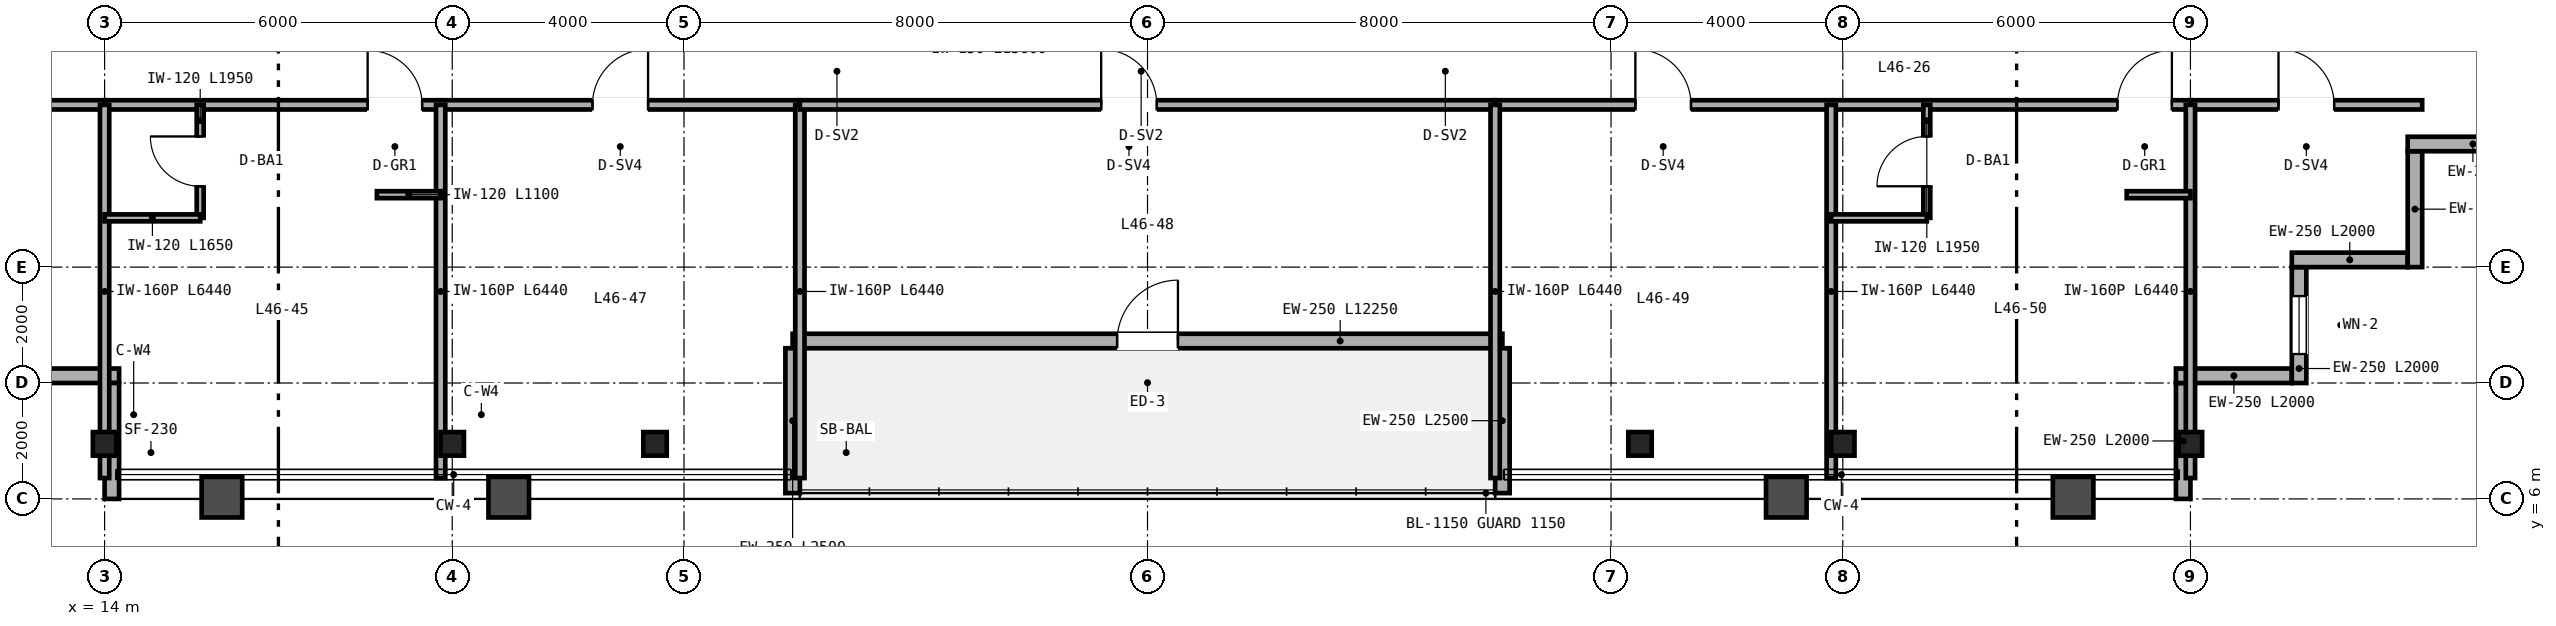
"""IFC4 building model, lengths in metres.
Left out: names, types, materials, properties, quantities, classifications, styles, units other than length and angle.
Written with IfcOpenShell. Run it as: python <this file> out.ifc"""

import sys

from ifc_helpers import new_model, si_unit, direction, frame, frame_2d, origin, origin_2d, place, context, subcontext, project, spatial, rectangle, i_section, extrude, source, transform, mapped, element, fill, save


model = new_model("IFC4")
c1 = context("Model", 3, precision=1e-05, world=origin(), true_north=direction((0.0, 1.0)))
c2 = subcontext(c1, "Body", "Model", "MODEL_VIEW")
j1 = project(units=[si_unit("LENGTHUNIT", "METRE"), si_unit("PLANEANGLEUNIT", "RADIAN")], contexts=[c1])
p1 = place(None, origin())
s1 = spatial("IfcSite", under=j1, at=p1, CompositionType="ELEMENT")
p2 = place(p1, origin())
s2 = spatial("IfcBuilding", under=s1, at=p2, CompositionType="ELEMENT")
p3 = place(p2, frame((0.0, 0.0, 184.8)))
s3 = spatial("IfcBuildingStorey", under=s2, at=p3, CompositionType="ELEMENT", Elevation=184.8)
m1 = source(origin(), c2, "Body", "SweptSolid", [
    extrude(i_section(OverallWidth=0.404, OverallDepth=0.407, WebThickness=0.027, FlangeThickness=0.044, FilletRadius=0.025, at=origin_2d()), origin(), (0.0, 0.0, 1.0), 3.37),
])
for number, where, z_axis, x_axis in (
    (1, (14.0, 6.95, 0.0), (0.0, 0.0, 1.0), (1.0, 0.0, 0.0)),
    (2, (20.0, 6.95, 0.0), (0.0, 0.0, 1.0), (1.0, 0.0, 0.0)),
    (3, (23.5, 6.95, 0.0), (0.0, 0.0, 1.0), (1.0, 0.0, 0.0)),
    (4, (40.5, 6.95, 0.0), (0.0, 0.0, 1.0), (1.0, 0.0, 0.0)),
    (5, (44.0, 6.95, 0.0), (0.0, 0.0, 1.0), (1.0, 0.0, 0.0)),
    (6, (50.0, 6.95, 0.0), (0.0, 0.0, 1.0), (1.0, 0.0, 0.0)),
):
    element("IfcColumn", number, at=place(p3, frame(where, z_axis=z_axis, x_axis=x_axis)), inside=s3, PredefinedType="COLUMN", context=c2, shape_type="MappedRepresentation", body=[
        mapped(m1, transform((0.0, 0.0, 0.0), scale=1.0)),
    ])
p4 = place(p3, frame((49.875, 6.0, 0.0), z_axis=(0.0, 0.0, 1.0), x_axis=(0.0, 1.0, 0.0)))
e7 = element("IfcWall", 7, at=p4, inside=s3, PredefinedType="SOLIDWALL", context=c2, shape_type="SweptSolid", body=[
    extrude(rectangle(XDim=2.0, YDim=0.25, at=frame_2d((1.0, 0.0))), origin(), (0.0, 0.0, 1.0), 2.677),
])
p5 = place(p3, frame((49.75, 8.125, 0.0), z_axis=(0.0, 0.0, 1.0), x_axis=(1.0, 0.0, 0.0)))
e8 = element("IfcWall", 8, at=p5, inside=s3, PredefinedType="SOLIDWALL", context=c2, shape_type="SweptSolid", body=[
    extrude(rectangle(XDim=2.0, YDim=0.25, at=frame_2d((1.0, 0.0))), origin(), (0.0, 0.0, 1.0), 3.37),
])
p6 = place(p3, frame((51.875, 8.0, 0.0), z_axis=(0.0, 0.0, 1.0), x_axis=(0.0, 1.0, 0.0)))
e9 = element("IfcWall", 9, at=p6, inside=s3, PredefinedType="SOLIDWALL", context=c2, shape_type="SweptSolid", body=[
    extrude(rectangle(XDim=2.0, YDim=0.25, at=frame_2d((1.0, 0.0))), origin(), (0.0, 0.0, 1.0), 3.37),
])
p7 = place(p6, frame((0.5, 0.0, 0.85)))
e10 = element("IfcOpeningElement", 10, at=p7, cuts=e9, PredefinedType="OPENING", context=c2, shape_type="SweptSolid", body=[
    extrude(rectangle(XDim=1.0, YDim=1.9, at=frame_2d((0.5, 0.95))), frame((0.0, 0.135, 0.0), z_axis=(0.0, -1.0, 0.0), x_axis=(1.0, 0.0, 0.0)), (0.0, 0.0, 1.0), 0.27),
])
for number, where, z_axis, x_axis in (
    (11, (51.75, 10.125, 0.0), (0.0, 0.0, 1.0), (1.0, 0.0, 0.0)),
    (12, (53.875, 10.0, 0.0), (0.0, 0.0, 1.0), (0.0, 1.0, 0.0)),
):
    element("IfcWall", number, at=place(p3, frame(where, z_axis=z_axis, x_axis=x_axis)), inside=s3, PredefinedType="SOLIDWALL", context=c2, shape_type="SweptSolid", body=[
        extrude(rectangle(XDim=2.0, YDim=0.25, at=frame_2d((1.0, 0.0))), origin(), (0.0, 0.0, 1.0), 3.37),
    ])
p8 = place(p3, frame((53.75, 12.125, 0.0), z_axis=(0.0, 0.0, 1.0), x_axis=(1.0, 0.0, 0.0)))
e13 = element("IfcWall", 13, at=p8, inside=s3, PredefinedType="SOLIDWALL", context=c2, shape_type="SweptSolid", body=[
    extrude(rectangle(XDim=2.25, YDim=0.25, at=frame_2d((1.125, 0.0))), origin(), (0.0, 0.0, 1.0), 3.37),
])
p9 = place(p3, frame((12.25, 8.125, 0.0), z_axis=(0.0, 0.0, 1.0), x_axis=(1.0, 0.0, 0.0)))
e14 = element("IfcWall", 14, at=p9, inside=s3, PredefinedType="SOLIDWALL", context=c2, shape_type="SweptSolid", body=[
    extrude(rectangle(XDim=2.0, YDim=0.25, at=frame_2d((1.0, 0.0))), origin(), (0.0, 0.0, 1.0), 3.37),
])
p10 = place(p3, frame((14.125, 8.0, 0.0), z_axis=(0.0, 0.0, 1.0), x_axis=(0.0, -1.0, 0.0)))
e15 = element("IfcWall", 15, at=p10, inside=s3, PredefinedType="SOLIDWALL", context=c2, shape_type="SweptSolid", body=[
    extrude(rectangle(XDim=2.0, YDim=0.25, at=frame_2d((1.0, 0.0))), origin(), (0.0, 0.0, 1.0), 2.677),
])
p11 = place(p3, frame((25.875, 8.725, 0.0), z_axis=(0.0, 0.0, 1.0), x_axis=(1.0, 0.0, 0.0)))
e16 = element("IfcWall", 16, at=p11, inside=s3, PredefinedType="SOLIDWALL", context=c2, shape_type="SweptSolid", body=[
    extrude(rectangle(XDim=12.25, YDim=0.25, at=frame_2d((6.125, 0.0))), origin(), (0.0, 0.0, 1.0), 3.37),
])
p12 = place(p11, frame((5.6, 0.0, 0.0)))
e17 = element("IfcOpeningElement", 17, at=p12, cuts=e16, PredefinedType="OPENING", context=c2, shape_type="SweptSolid", body=[
    extrude(rectangle(XDim=1.05, YDim=2.15, at=frame_2d((0.525, 1.075))), frame((0.0, 0.135, 0.0), z_axis=(0.0, -1.0, 0.0), x_axis=(1.0, 0.0, 0.0)), (0.0, 0.0, 1.0), 0.27),
])
for number, where, z_axis, x_axis in (
    (18, (25.875, 6.1, 0.0), (0.0, 0.0, 1.0), (0.0, 1.0, 0.0)),
    (19, (38.125, 6.1, 0.0), (0.0, 0.0, 1.0), (0.0, 1.0, 0.0)),
):
    element("IfcWall", number, at=place(p3, frame(where, z_axis=z_axis, x_axis=x_axis)), inside=s3, PredefinedType="SOLIDWALL", context=c2, shape_type="SweptSolid", body=[
        extrude(rectangle(XDim=2.5, YDim=0.25, at=frame_2d((1.25, 0.0))), origin(), (0.0, 0.0, 1.0), 2.443),
    ])
p13 = place(p3, frame((10.0, 12.8, 0.0), z_axis=(0.0, 0.0, 1.0), x_axis=(1.0, 0.0, 0.0)))
e20 = element("IfcWall", 20, at=p13, inside=s3, PredefinedType="PARTITIONING", context=c2, shape_type="SweptSolid", body=[
    extrude(rectangle(XDim=4.0, YDim=0.16, at=frame_2d((2.0, 0.0))), origin(), (0.0, 0.0, 1.0), 3.37),
])
p14 = place(p13, frame((1.52, 0.0, 0.0)))
e21 = element("IfcOpeningElement", 21, at=p14, cuts=e20, PredefinedType="OPENING", context=c2, shape_type="SweptSolid", body=[
    extrude(rectangle(XDim=0.96, YDim=2.15, at=frame_2d((0.48, 1.075))), frame((0.0, 0.09, 0.0), z_axis=(0.0, -1.0, 0.0), x_axis=(1.0, 0.0, 0.0)), (0.0, 0.0, 1.0), 0.18),
])
p15 = place(p3, frame((50.0, 12.8, 0.0), z_axis=(0.0, 0.0, 1.0), x_axis=(1.0, 0.0, 0.0)))
e22 = element("IfcWall", 22, at=p15, inside=s3, PredefinedType="PARTITIONING", context=c2, shape_type="SweptSolid", body=[
    extrude(rectangle(XDim=4.0, YDim=0.16, at=frame_2d((2.0, 0.0))), origin(), (0.0, 0.0, 1.0), 3.37),
])
p16 = place(p15, frame((1.52, 0.0, 0.0)))
e23 = element("IfcOpeningElement", 23, at=p16, cuts=e22, PredefinedType="OPENING", context=c2, shape_type="SweptSolid", body=[
    extrude(rectangle(XDim=0.96, YDim=2.15, at=frame_2d((0.48, 1.075))), frame((0.0, 0.09, 0.0), z_axis=(0.0, -1.0, 0.0), x_axis=(1.0, 0.0, 0.0)), (0.0, 0.0, 1.0), 0.18),
])
p17 = place(p3, frame((14.0, 12.8, 0.0), z_axis=(0.0, 0.0, 1.0), x_axis=(1.0, 0.0, 0.0)))
e24 = element("IfcWall", 24, at=p17, inside=s3, PredefinedType="PARTITIONING", context=c2, shape_type="SweptSolid", body=[
    extrude(rectangle(XDim=12.0, YDim=0.16, at=frame_2d((6.0, 0.0))), origin(), (0.0, 0.0, 1.0), 2.913),
])
p18 = place(p17, frame((4.54, 0.0, 0.0)))
e25 = element("IfcOpeningElement", 25, at=p18, cuts=e24, PredefinedType="OPENING", context=c2, shape_type="SweptSolid", body=[
    extrude(rectangle(XDim=0.94, YDim=2.15, at=frame_2d((0.47, 1.075))), frame((0.0, 0.09, 0.0), z_axis=(0.0, -1.0, 0.0), x_axis=(1.0, 0.0, 0.0)), (0.0, 0.0, 1.0), 0.18),
])
p19 = place(p17, frame((8.42, 0.0, 0.0)))
e26 = element("IfcOpeningElement", 26, at=p19, cuts=e24, PredefinedType="OPENING", context=c2, shape_type="SweptSolid", body=[
    extrude(rectangle(XDim=0.96, YDim=2.15, at=frame_2d((0.48, 1.075))), frame((0.0, 0.09, 0.0), z_axis=(0.0, -1.0, 0.0), x_axis=(1.0, 0.0, 0.0)), (0.0, 0.0, 1.0), 0.18),
])
p20 = place(p3, frame((14.0, 6.36, 0.0), z_axis=(0.0, 0.0, 1.0), x_axis=(0.0, 1.0, 0.0)))
e27 = element("IfcWall", 27, at=p20, inside=s3, PredefinedType="PARTITIONING", context=c2, shape_type="SweptSolid", body=[
    extrude(rectangle(XDim=6.44, YDim=0.16, at=frame_2d((3.22, 0.0))), origin(), (0.0, 0.0, 1.0), 2.677),
])
p21 = place(p3, frame((26.0, 6.36, 0.0), z_axis=(0.0, 0.0, 1.0), x_axis=(0.0, 1.0, 0.0)))
e28 = element("IfcWall", 28, at=p21, inside=s3, PredefinedType="PARTITIONING", context=c2, shape_type="SweptSolid", body=[
    extrude(rectangle(XDim=6.44, YDim=0.16, at=frame_2d((3.22, 0.0))), origin(), (0.0, 0.0, 1.0), 2.443),
])
p22 = place(p3, frame((19.8, 6.36, 0.0), z_axis=(0.0, 0.0, 1.0), x_axis=(0.0, 1.0, 0.0)))
e29 = element("IfcWall", 29, at=p22, inside=s3, PredefinedType="PARTITIONING", context=c2, shape_type="SweptSolid", body=[
    extrude(rectangle(XDim=6.44, YDim=0.16, at=frame_2d((3.22, 0.0))), origin(), (0.0, 0.0, 1.0), 2.677),
])
p23 = place(p3, frame((15.65, 10.85, 0.0), z_axis=(0.0, 0.0, 1.0), x_axis=(0.0, 1.0, 0.0)))
e30 = element("IfcWall", 30, at=p23, inside=s3, PredefinedType="PARTITIONING", context=c2, shape_type="SweptSolid", body=[
    extrude(rectangle(XDim=1.95, YDim=0.12, at=frame_2d((0.975, 0.0))), origin(), (0.0, 0.0, 1.0), 3.37),
])
p24 = place(p23, frame((0.545, 0.0, 0.0)))
e31 = element("IfcOpeningElement", 31, at=p24, cuts=e30, PredefinedType="OPENING", context=c2, shape_type="SweptSolid", body=[
    extrude(rectangle(XDim=0.86, YDim=2.1, at=frame_2d((0.43, 1.05))), frame((0.0, 0.07, 0.0), z_axis=(0.0, -1.0, 0.0), x_axis=(1.0, 0.0, 0.0)), (0.0, 0.0, 1.0), 0.14),
])
p25 = place(p3, frame((14.0, 10.85, 0.0), z_axis=(0.0, 0.0, 1.0), x_axis=(1.0, 0.0, 0.0)))
e32 = element("IfcWall", 32, at=p25, inside=s3, PredefinedType="PARTITIONING", context=c2, shape_type="SweptSolid", body=[
    extrude(rectangle(XDim=1.65, YDim=0.12, at=frame_2d((0.825, 0.0))), origin(), (0.0, 0.0, 1.0), 3.37),
])
p26 = place(p3, frame((18.7, 11.25, 0.0), z_axis=(0.0, 0.0, 1.0), x_axis=(1.0, 0.0, 0.0)))
e33 = element("IfcWall", 33, at=p26, inside=s3, PredefinedType="PARTITIONING", context=c2, shape_type="SweptSolid", body=[
    extrude(rectangle(XDim=1.1, YDim=0.12, at=frame_2d((0.55, 0.0))), origin(), (0.0, 0.0, 1.0), 3.37),
])
p27 = place(p3, frame((26.0, 12.8, 0.0), z_axis=(0.0, 0.0, 1.0), x_axis=(1.0, 0.0, 0.0)))
e34 = element("IfcWall", 34, at=p27, inside=s3, PredefinedType="PARTITIONING", context=c2, shape_type="SweptSolid", body=[
    extrude(rectangle(XDim=12.0, YDim=0.16, at=frame_2d((6.0, 0.0))), origin(), (0.0, 0.0, 1.0), 3.37),
])
p28 = place(p27, frame((5.2, 0.0, 0.0)))
e35 = element("IfcOpeningElement", 35, at=p28, cuts=e34, PredefinedType="OPENING", context=c2, shape_type="SweptSolid", body=[
    extrude(rectangle(XDim=0.96, YDim=2.15, at=frame_2d((0.48, 1.075))), frame((0.0, 0.09, 0.0), z_axis=(0.0, -1.0, 0.0), x_axis=(1.0, 0.0, 0.0)), (0.0, 0.0, 1.0), 0.18),
])
p29 = place(p3, frame((38.0, 12.8, 0.0), z_axis=(0.0, 0.0, 1.0), x_axis=(1.0, 0.0, 0.0)))
e36 = element("IfcWall", 36, at=p29, inside=s3, PredefinedType="PARTITIONING", context=c2, shape_type="SweptSolid", body=[
    extrude(rectangle(XDim=12.0, YDim=0.16, at=frame_2d((6.0, 0.0))), origin(), (0.0, 0.0, 1.0), 2.913),
])
p30 = place(p29, frame((2.42, 0.0, 0.0)))
e37 = element("IfcOpeningElement", 37, at=p30, cuts=e36, PredefinedType="OPENING", context=c2, shape_type="SweptSolid", body=[
    extrude(rectangle(XDim=0.96, YDim=2.15, at=frame_2d((0.48, 1.075))), frame((0.0, 0.09, 0.0), z_axis=(0.0, -1.0, 0.0), x_axis=(1.0, 0.0, 0.0)), (0.0, 0.0, 1.0), 0.18),
])
p31 = place(p29, frame((10.74, 0.0, 0.0)))
e38 = element("IfcOpeningElement", 38, at=p31, cuts=e36, PredefinedType="OPENING", context=c2, shape_type="SweptSolid", body=[
    extrude(rectangle(XDim=0.94, YDim=2.15, at=frame_2d((0.47, 1.075))), frame((0.0, 0.09, 0.0), z_axis=(0.0, -1.0, 0.0), x_axis=(1.0, 0.0, 0.0)), (0.0, 0.0, 1.0), 0.18),
])
p32 = place(p3, frame((38.0, 6.36, 0.0), z_axis=(0.0, 0.0, 1.0), x_axis=(0.0, 1.0, 0.0)))
e39 = element("IfcWall", 39, at=p32, inside=s3, PredefinedType="PARTITIONING", context=c2, shape_type="SweptSolid", body=[
    extrude(rectangle(XDim=6.44, YDim=0.16, at=frame_2d((3.22, 0.0))), origin(), (0.0, 0.0, 1.0), 2.443),
])
for number, where, z_axis, x_axis in (
    (40, (50.0, 6.36, 0.0), (0.0, 0.0, 1.0), (0.0, 1.0, 0.0)),
    (41, (43.8, 6.36, 0.0), (0.0, 0.0, 1.0), (0.0, 1.0, 0.0)),
):
    element("IfcWall", number, at=place(p3, frame(where, z_axis=z_axis, x_axis=x_axis)), inside=s3, PredefinedType="PARTITIONING", context=c2, shape_type="SweptSolid", body=[
        extrude(rectangle(XDim=6.44, YDim=0.16, at=frame_2d((3.22, 0.0))), origin(), (0.0, 0.0, 1.0), 2.677),
    ])
p33 = place(p3, frame((45.45, 10.85, 0.0), z_axis=(0.0, 0.0, 1.0), x_axis=(0.0, 1.0, 0.0)))
e42 = element("IfcWall", 42, at=p33, inside=s3, PredefinedType="PARTITIONING", context=c2, shape_type="SweptSolid", body=[
    extrude(rectangle(XDim=1.95, YDim=0.12, at=frame_2d((0.975, 0.0))), origin(), (0.0, 0.0, 1.0), 3.37),
])
p34 = place(p33, frame((0.545, 0.0, 0.0)))
e43 = element("IfcOpeningElement", 43, at=p34, cuts=e42, PredefinedType="OPENING", context=c2, shape_type="SweptSolid", body=[
    extrude(rectangle(XDim=0.86, YDim=2.1, at=frame_2d((0.43, 1.05))), frame((0.0, 0.07, 0.0), z_axis=(0.0, -1.0, 0.0), x_axis=(1.0, 0.0, 0.0)), (0.0, 0.0, 1.0), 0.14),
])
p35 = place(p3, frame((43.8, 10.85, 0.0), z_axis=(0.0, 0.0, 1.0), x_axis=(1.0, 0.0, 0.0)))
e44 = element("IfcWall", 44, at=p35, inside=s3, PredefinedType="PARTITIONING", context=c2, shape_type="SweptSolid", body=[
    extrude(rectangle(XDim=1.65, YDim=0.12, at=frame_2d((0.825, 0.0))), origin(), (0.0, 0.0, 1.0), 3.37),
])
p36 = place(p3, frame((48.9, 11.25, 0.0), z_axis=(0.0, 0.0, 1.0), x_axis=(1.0, 0.0, 0.0)))
e45 = element("IfcWall", 45, at=p36, inside=s3, PredefinedType="PARTITIONING", context=c2, shape_type="SweptSolid", body=[
    extrude(rectangle(XDim=1.1, YDim=0.12, at=frame_2d((0.55, 0.0))), origin(), (0.0, 0.0, 1.0), 3.37),
])
m2 = source(origin(), c2, "Body", "SweptSolid", [
    extrude(rectangle(XDim=1.0, YDim=1.9, at=frame_2d((0.5, 0.95))), frame((0.0, 0.03, 0.0), z_axis=(0.0, -1.0, 0.0), x_axis=(1.0, 0.0, 0.0)), (0.0, 0.0, 1.0), 0.06),
])
p37 = place(p7, origin())
e46 = element("IfcWindow", 46, at=p37, inside=s3, PartitioningType="SINGLE_PANEL", PredefinedType="WINDOW", context=c2, shape_type="MappedRepresentation", body=[
    mapped(m2, transform((0.0, 0.0, 0.0), scale=1.0)),
])
fill(e10, e46)
m3 = source(origin(), c2, "Body", "SweptSolid", [
    extrude(rectangle(XDim=1.05, YDim=2.15, at=frame_2d((0.525, 1.075))), frame((0.0, 0.025, 0.0), z_axis=(0.0, -1.0, 0.0), x_axis=(1.0, 0.0, 0.0)), (0.0, 0.0, 1.0), 0.05),
])
p38 = place(p12, origin())
e47 = element("IfcDoor", 47, at=p38, inside=s3, OperationType="SINGLE_SWING_RIGHT", PredefinedType="DOOR", context=c2, shape_type="MappedRepresentation", body=[
    mapped(m3, transform((0.0, 0.0, 0.0), scale=1.0)),
])
fill(e17, e47)
m4 = source(origin(), c2, "Body", "SweptSolid", [
    extrude(rectangle(XDim=0.96, YDim=2.15, at=frame_2d((0.48, 1.075))), frame((0.0, 0.025, 0.0), z_axis=(0.0, -1.0, 0.0), x_axis=(1.0, 0.0, 0.0)), (0.0, 0.0, 1.0), 0.05),
])
p39 = place(p16, origin())
e48 = element("IfcDoor", 48, at=p39, inside=s3, OperationType="SINGLE_SWING_LEFT", PredefinedType="DOOR", context=c2, shape_type="MappedRepresentation", body=[
    mapped(m4, transform((0.0, 0.0, 0.0), scale=1.0)),
])
fill(e23, e48)
m5 = source(origin(), c2, "Body", "SweptSolid", [
    extrude(rectangle(XDim=0.86, YDim=2.1, at=frame_2d((0.43, 1.05))), frame((0.0, 0.025, 0.0), z_axis=(0.0, -1.0, 0.0), x_axis=(1.0, 0.0, 0.0)), (0.0, 0.0, 1.0), 0.05),
])
p40 = place(p24, origin())
e49 = element("IfcDoor", 49, at=p40, inside=s3, OperationType="SINGLE_SWING_RIGHT", PredefinedType="DOOR", context=c2, shape_type="MappedRepresentation", body=[
    mapped(m5, transform((0.0, 0.0, 0.0), scale=1.0)),
])
fill(e31, e49)
m6 = source(origin(), c2, "Body", "SweptSolid", [
    extrude(rectangle(XDim=0.94, YDim=2.15, at=frame_2d((0.47, 1.075))), frame((0.0, 0.025, 0.0), z_axis=(0.0, -1.0, 0.0), x_axis=(1.0, 0.0, 0.0)), (0.0, 0.0, 1.0), 0.05),
])
p41 = place(p18, origin())
e50 = element("IfcDoor", 50, at=p41, inside=s3, OperationType="SINGLE_SWING_LEFT", PredefinedType="DOOR", context=c2, shape_type="MappedRepresentation", body=[
    mapped(m6, transform((0.0, 0.0, 0.0), scale=1.0)),
])
fill(e25, e50)
p42 = place(p19, origin())
e51 = element("IfcDoor", 51, at=p42, inside=s3, OperationType="SINGLE_SWING_RIGHT", PredefinedType="DOOR", context=c2, shape_type="MappedRepresentation", body=[
    mapped(m4, transform((0.0, 0.0, 0.0), scale=1.0)),
])
fill(e26, e51)
p43 = place(p28, origin())
e52 = element("IfcDoor", 52, at=p43, inside=s3, OperationType="SINGLE_SWING_LEFT", PredefinedType="DOOR", context=c2, shape_type="MappedRepresentation", body=[
    mapped(m4, transform((0.0, 0.0, 0.0), scale=1.0)),
])
fill(e35, e52)
p44 = place(p34, origin())
e53 = element("IfcDoor", 53, at=p44, inside=s3, OperationType="SINGLE_SWING_LEFT", PredefinedType="DOOR", context=c2, shape_type="MappedRepresentation", body=[
    mapped(m5, transform((0.0, 0.0, 0.0), scale=1.0)),
])
fill(e43, e53)
p45 = place(p30, origin())
e54 = element("IfcDoor", 54, at=p45, inside=s3, OperationType="SINGLE_SWING_LEFT", PredefinedType="DOOR", context=c2, shape_type="MappedRepresentation", body=[
    mapped(m4, transform((0.0, 0.0, 0.0), scale=1.0)),
])
fill(e37, e54)
p46 = place(p31, origin())
e55 = element("IfcDoor", 55, at=p46, inside=s3, OperationType="SINGLE_SWING_RIGHT", PredefinedType="DOOR", context=c2, shape_type="MappedRepresentation", body=[
    mapped(m6, transform((0.0, 0.0, 0.0), scale=1.0)),
])
fill(e38, e55)
save(model, sys.argv[1])
